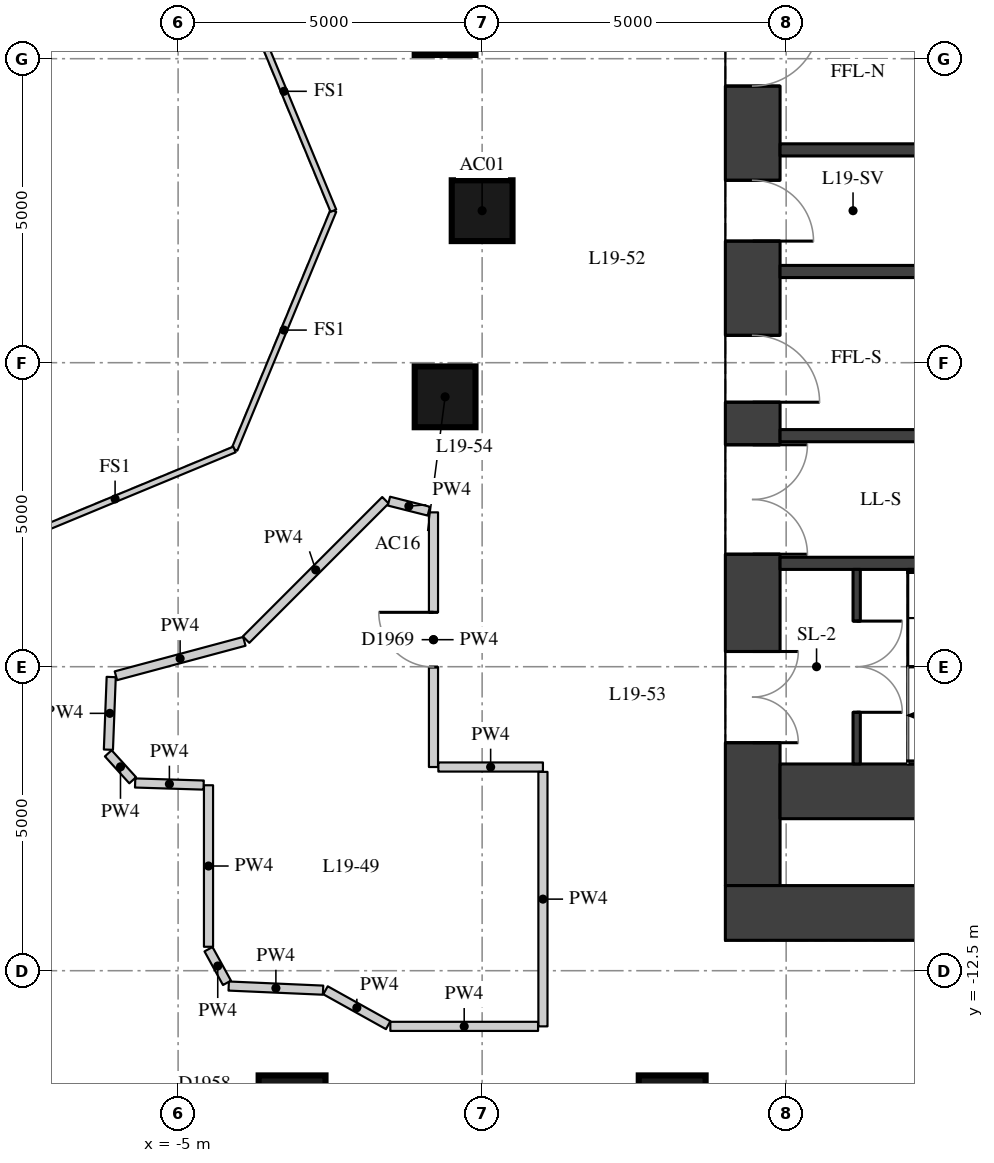
"""IFC4 building model, lengths in metres.
Left out: names, types, materials, properties, quantities, classifications, styles, units other than length and angle.
Written with IfcOpenShell. Run it as: python <this file> out.ifc"""

import sys

from ifc_helpers import new_model, si_unit, direction, frame, frame_2d, origin, origin_2d, place, context, subcontext, project, spatial, rectangle, extrude, element, fill, save


model = new_model("IFC4")
c1 = context("Model", 3, precision=1e-05, world=origin(), true_north=direction((0.0, 1.0)))
c2 = subcontext(c1, "Body", "Model", "MODEL_VIEW")
j1 = project(units=[si_unit("LENGTHUNIT", "METRE"), si_unit("PLANEANGLEUNIT", "RADIAN")], contexts=[c1])
p1 = place(None, origin())
s1 = spatial("IfcSite", under=j1, at=p1, CompositionType="ELEMENT")
p2 = place(p1, origin())
s2 = spatial("IfcBuilding", under=s1, at=p2, CompositionType="ELEMENT")
p3 = place(p2, frame((0.0, 0.0, 71.2)))
s3 = spatial("IfcBuildingStorey", under=s2, at=p3, CompositionType="ELEMENT", Elevation=71.2)
for number, where, z_axis, x_axis in (
    (1, (0.0, 0.0, 0.0), (0.0, 0.0, 1.0), (1.0, 0.0, 0.0)),
    (2, (-0.609, 3.062, 0.0), (0.0, 0.0, 1.0), (1.0, 0.0, 0.0)),
    (3, (-0.609, -3.062, 0.0), (0.0, 0.0, 1.0), (1.0, 0.0, 0.0)),
):
    element("IfcColumn", number, at=place(p3, frame(where, z_axis=z_axis, x_axis=x_axis)), inside=s3, PredefinedType="COLUMN", context=c2, shape_type="SweptSolid", body=[
        extrude(rectangle(XDim=1.0, YDim=1.0, at=origin_2d()), origin(), (0.0, 0.0, 1.0), 3.3),
    ])
for number, where, z_axis, x_axis in (
    (4, (-3.126, -14.772, 0.0), (0.0, 0.0, 1.0), (1.0, 0.0, 0.0)),
    (5, (3.126, -14.772, 0.0), (0.0, 0.0, 1.0), (1.0, 0.0, 0.0)),
):
    element("IfcColumn", number, at=place(p3, frame(where, z_axis=z_axis, x_axis=x_axis)), inside=s3, PredefinedType="COLUMN", context=c2, shape_type="SweptSolid", body=[
        extrude(rectangle(XDim=1.1, YDim=1.1, at=origin_2d()), origin(), (0.0, 0.0, 1.0), 3.3),
    ])
p4 = place(p3, frame((4.45, -11.1, 0.0), z_axis=(0.0, 0.0, 1.0), x_axis=(0.0, 1.0, 0.0)))
e6 = element("IfcWall", 6, at=p4, inside=s3, PredefinedType="SHEAR", context=c2, shape_type="SweptSolid", body=[
    extrude(rectangle(XDim=22.2, YDim=0.9, at=frame_2d((11.1, 0.0))), origin(), (0.0, 0.0, 1.0), 3.02),
])
p5 = place(p4, frame((2.35, 0.0, 0.0)))
e7 = element("IfcOpeningElement", 7, at=p5, cuts=e6, PredefinedType="OPENING", context=c2, shape_type="SweptSolid", body=[
    extrude(rectangle(XDim=1.5, YDim=2.1, at=frame_2d((0.75, 1.05))), frame((0.0, 0.46, 0.0), z_axis=(0.0, -1.0, 0.0), x_axis=(1.0, 0.0, 0.0)), (0.0, 0.0, 1.0), 0.92),
])
p6 = place(p4, frame((5.45, 0.0, 0.0)))
e8 = element("IfcOpeningElement", 8, at=p6, cuts=e6, PredefinedType="OPENING", context=c2, shape_type="SweptSolid", body=[
    extrude(rectangle(XDim=1.8, YDim=2.1, at=frame_2d((0.9, 1.05))), frame((0.0, 0.46, 0.0), z_axis=(0.0, -1.0, 0.0), x_axis=(1.0, 0.0, 0.0)), (0.0, 0.0, 1.0), 0.92),
])
p7 = place(p4, frame((7.95, 0.0, 0.0)))
e9 = element("IfcOpeningElement", 9, at=p7, cuts=e6, PredefinedType="OPENING", context=c2, shape_type="SweptSolid", body=[
    extrude(rectangle(XDim=1.1, YDim=2.1, at=frame_2d((0.55, 1.05))), frame((0.0, 0.46, 0.0), z_axis=(0.0, -1.0, 0.0), x_axis=(1.0, 0.0, 0.0)), (0.0, 0.0, 1.0), 0.92),
])
p8 = place(p4, frame((10.6, 0.0, 0.0)))
e10 = element("IfcOpeningElement", 10, at=p8, cuts=e6, PredefinedType="OPENING", context=c2, shape_type="SweptSolid", body=[
    extrude(rectangle(XDim=1.0, YDim=2.1, at=frame_2d((0.5, 1.05))), frame((0.0, 0.46, 0.0), z_axis=(0.0, -1.0, 0.0), x_axis=(1.0, 0.0, 0.0)), (0.0, 0.0, 1.0), 0.92),
])
p9 = place(p4, frame((13.15, 0.0, 0.0)))
e11 = element("IfcOpeningElement", 11, at=p9, cuts=e6, PredefinedType="OPENING", context=c2, shape_type="SweptSolid", body=[
    extrude(rectangle(XDim=1.1, YDim=2.1, at=frame_2d((0.55, 1.05))), frame((0.0, 0.46, 0.0), z_axis=(0.0, -1.0, 0.0), x_axis=(1.0, 0.0, 0.0)), (0.0, 0.0, 1.0), 0.92),
])
p10 = place(p4, frame((14.95, 0.0, 0.0)))
e12 = element("IfcOpeningElement", 12, at=p10, cuts=e6, PredefinedType="OPENING", context=c2, shape_type="SweptSolid", body=[
    extrude(rectangle(XDim=1.8, YDim=2.1, at=frame_2d((0.9, 1.05))), frame((0.0, 0.46, 0.0), z_axis=(0.0, -1.0, 0.0), x_axis=(1.0, 0.0, 0.0)), (0.0, 0.0, 1.0), 0.92),
])
p11 = place(p4, frame((18.35, 0.0, 0.0)))
e13 = element("IfcOpeningElement", 13, at=p11, cuts=e6, PredefinedType="OPENING", context=c2, shape_type="SweptSolid", body=[
    extrude(rectangle(XDim=1.5, YDim=2.1, at=frame_2d((0.75, 1.05))), frame((0.0, 0.46, 0.0), z_axis=(0.0, -1.0, 0.0), x_axis=(1.0, 0.0, 0.0)), (0.0, 0.0, 1.0), 0.92),
])
p12 = place(p3, frame((4.0, -11.55, 0.0), z_axis=(0.0, 0.0, 1.0), x_axis=(1.0, 0.0, 0.0)))
e14 = element("IfcWall", 14, at=p12, inside=s3, PredefinedType="SHEAR", context=c2, shape_type="SweptSolid", body=[
    extrude(rectangle(XDim=15.2, YDim=0.9, at=frame_2d((7.6, 0.0))), origin(), (0.0, 0.0, 1.0), 3.02),
])
p13 = place(p3, frame((4.9, -9.55, 0.0), z_axis=(0.0, 0.0, 1.0), x_axis=(1.0, 0.0, 0.0)))
e15 = element("IfcWall", 15, at=p13, inside=s3, PredefinedType="SHEAR", context=c2, shape_type="SweptSolid", body=[
    extrude(rectangle(XDim=10.2, YDim=0.9, at=frame_2d((5.1, 0.0))), origin(), (0.0, 0.0, 1.0), 3.02),
])
for number, where, z_axis, x_axis in (
    (16, (4.9, 1.0, 0.0), (0.0, 0.0, 1.0), (1.0, 0.0, 0.0)),
    (17, (4.9, -1.0, 0.0), (0.0, 0.0, 1.0), (1.0, 0.0, 0.0)),
):
    element("IfcWall", number, at=place(p3, frame(where, z_axis=z_axis, x_axis=x_axis)), inside=s3, PredefinedType="SHEAR", context=c2, shape_type="SweptSolid", body=[
        extrude(rectangle(XDim=10.2, YDim=0.2, at=frame_2d((5.1, 0.0))), origin(), (0.0, 0.0, 1.0), 3.02),
    ])
p14 = place(p3, frame((4.9, -3.7, 0.0), z_axis=(0.0, 0.0, 1.0), x_axis=(1.0, 0.0, 0.0)))
e18 = element("IfcWall", 18, at=p14, inside=s3, PredefinedType="SHEAR", context=c2, shape_type="SweptSolid", body=[
    extrude(rectangle(XDim=10.2, YDim=0.2, at=frame_2d((5.1, 0.0))), origin(), (0.0, 0.0, 1.0), 3.02),
])
p15 = place(p14, frame((6.3, 0.0, 0.0)))
e19 = element("IfcOpeningElement", 19, at=p15, cuts=e18, PredefinedType="OPENING", context=c2, shape_type="SweptSolid", body=[
    extrude(rectangle(XDim=1.1, YDim=2.1, at=frame_2d((0.55, 1.05))), frame((0.0, 0.11, 0.0), z_axis=(0.0, -1.0, 0.0), x_axis=(1.0, 0.0, 0.0)), (0.0, 0.0, 1.0), 0.22),
])
p16 = place(p14, frame((8.6, 0.0, 0.0)))
e20 = element("IfcOpeningElement", 20, at=p16, cuts=e18, PredefinedType="OPENING", context=c2, shape_type="SweptSolid", body=[
    extrude(rectangle(XDim=1.1, YDim=2.1, at=frame_2d((0.55, 1.05))), frame((0.0, 0.11, 0.0), z_axis=(0.0, -1.0, 0.0), x_axis=(1.0, 0.0, 0.0)), (0.0, 0.0, 1.0), 0.22),
])
p17 = place(p3, frame((4.9, -5.8, 0.0), z_axis=(0.0, 0.0, 1.0), x_axis=(1.0, 0.0, 0.0)))
e21 = element("IfcWall", 21, at=p17, inside=s3, PredefinedType="SHEAR", context=c2, shape_type="SweptSolid", body=[
    extrude(rectangle(XDim=10.2, YDim=0.2, at=frame_2d((5.1, 0.0))), origin(), (0.0, 0.0, 1.0), 3.02),
])
p18 = place(p3, frame((6.16, -9.1, 0.0), z_axis=(0.0, 0.0, 1.0), x_axis=(0.0, 1.0, 0.0)))
e22 = element("IfcWall", 22, at=p18, inside=s3, PredefinedType="SHEAR", context=c2, shape_type="SweptSolid", body=[
    extrude(rectangle(XDim=3.2, YDim=0.12, at=frame_2d((1.6, 0.0))), origin(), (0.0, 0.0, 1.0), 3.02),
])
p19 = place(p18, frame((0.85, 0.0, 0.0)))
e23 = element("IfcOpeningElement", 23, at=p19, cuts=e22, PredefinedType="OPENING", context=c2, shape_type="SweptSolid", body=[
    extrude(rectangle(XDim=1.5, YDim=2.1, at=frame_2d((0.75, 1.05))), frame((0.0, 0.07, 0.0), z_axis=(0.0, -1.0, 0.0), x_axis=(1.0, 0.0, 0.0)), (0.0, 0.0, 1.0), 0.14),
])
p20 = place(p3, frame((9.586, -13.719, 0.0), z_axis=(0.0, 0.0, 1.0), x_axis=(-0.888664904046, -0.458557181076, 0.0)))
e24 = element("IfcWall", 24, at=p20, inside=s3, PredefinedType="PARTITIONING", context=c2, shape_type="SweptSolid", body=[
    extrude(rectangle(XDim=3.046, YDim=0.2, at=frame_2d((1.523, 0.0))), origin(), (0.0, 0.0, 1.0), 3.02),
])
p21 = place(p3, frame((-0.8, -4.961, 0.0), z_axis=(0.0, 0.0, 1.0), x_axis=(0.0, -1.0, 0.0)))
e25 = element("IfcWall", 25, at=p21, inside=s3, PredefinedType="PARTITIONING", context=c2, shape_type="SweptSolid", body=[
    extrude(rectangle(XDim=4.188, YDim=0.15, at=frame_2d((2.094, 0.0))), origin(), (0.0, 0.0, 1.0), 3.02),
])
p22 = place(p21, frame((1.644, 0.0, 0.0)))
e26 = element("IfcOpeningElement", 26, at=p22, cuts=e25, PredefinedType="OPENING", context=c2, shape_type="SweptSolid", body=[
    extrude(rectangle(XDim=0.9, YDim=2.1, at=frame_2d((0.45, 1.05))), frame((0.0, 0.085, 0.0), z_axis=(0.0, -1.0, 0.0), x_axis=(1.0, 0.0, 0.0)), (0.0, 0.0, 1.0), 0.17),
])
p23 = place(p3, frame((-0.72, -9.15, 0.0), z_axis=(0.0, 0.0, 1.0), x_axis=(1.0, 0.0, 0.0)))
e27 = element("IfcWall", 27, at=p23, inside=s3, PredefinedType="PARTITIONING", context=c2, shape_type="SweptSolid", body=[
    extrude(rectangle(XDim=1.72, YDim=0.15, at=frame_2d((0.86, 0.0))), origin(), (0.0, 0.0, 1.0), 3.02),
])
p24 = place(p3, frame((1.0, -9.23, 0.0), z_axis=(0.0, 0.0, 1.0), x_axis=(0.0, -1.0, 0.0)))
e28 = element("IfcWall", 28, at=p24, inside=s3, PredefinedType="PARTITIONING", context=c2, shape_type="SweptSolid", body=[
    extrude(rectangle(XDim=4.186, YDim=0.15, at=frame_2d((2.093, 0.0))), origin(), (0.0, 0.0, 1.0), 3.02),
])
p25 = place(p3, frame((0.92, -13.416, 0.0), z_axis=(0.0, 0.0, 1.0), x_axis=(-1.0, 0.0, 0.0)))
e29 = element("IfcWall", 29, at=p25, inside=s3, PredefinedType="PARTITIONING", context=c2, shape_type="SweptSolid", body=[
    extrude(rectangle(XDim=2.43, YDim=0.15, at=frame_2d((1.215, 0.0))), origin(), (0.0, 0.0, 1.0), 3.02),
])
p26 = place(p3, frame((-1.545, -13.396, 0.0), z_axis=(0.0, 0.0, 1.0), x_axis=(-0.873678559566, 0.486503622345, 0.0)))
e30 = element("IfcWall", 30, at=p26, inside=s3, PredefinedType="PARTITIONING", context=c2, shape_type="SweptSolid", body=[
    extrude(rectangle(XDim=1.18, YDim=0.15, at=frame_2d((0.59, 0.0))), origin(), (0.0, 0.0, 1.0), 3.02),
])
p27 = place(p3, frame((-2.616, -12.82, 0.0), z_axis=(0.0, 0.0, 1.0), x_axis=(-0.99904515517, 0.04368956318, 0.0)))
e31 = element("IfcWall", 31, at=p27, inside=s3, PredefinedType="PARTITIONING", context=c2, shape_type="SweptSolid", body=[
    extrude(rectangle(XDim=1.553, YDim=0.15, at=frame_2d((0.777, 0.0))), origin(), (0.0, 0.0, 1.0), 3.02),
])
p28 = place(p3, frame((-4.196, -12.699, 0.0), z_axis=(0.0, 0.0, 1.0), x_axis=(-0.481398734925, 0.876501715921, 0.0)))
e32 = element("IfcWall", 32, at=p28, inside=s3, PredefinedType="PARTITIONING", context=c2, shape_type="SweptSolid", body=[
    extrude(rectangle(XDim=0.631, YDim=0.15, at=frame_2d((0.315, 0.0))), origin(), (0.0, 0.0, 1.0), 3.02),
])
p29 = place(p3, frame((-4.5, -12.106, 0.0), z_axis=(0.0, 0.0, 1.0), x_axis=(0.0, 1.0, 0.0)))
e33 = element("IfcWall", 33, at=p29, inside=s3, PredefinedType="PARTITIONING", context=c2, shape_type="SweptSolid", body=[
    extrude(rectangle(XDim=2.656, YDim=0.15, at=frame_2d((1.328, 0.0))), origin(), (0.0, 0.0, 1.0), 3.02),
])
p30 = place(p3, frame((-4.58, -9.447, 0.0), z_axis=(0.0, 0.0, 1.0), x_axis=(-0.999526758156, 0.030761334993, 0.0)))
e34 = element("IfcWall", 34, at=p30, inside=s3, PredefinedType="PARTITIONING", context=c2, shape_type="SweptSolid", body=[
    extrude(rectangle(XDim=1.127, YDim=0.15, at=frame_2d((0.563, 0.0))), origin(), (0.0, 0.0, 1.0), 3.02),
])
p31 = place(p3, frame((-5.747, -9.368, 0.0), z_axis=(0.0, 0.0, 1.0), x_axis=(-0.671757620202, 0.740771017049, 0.0)))
e35 = element("IfcWall", 35, at=p31, inside=s3, PredefinedType="PARTITIONING", context=c2, shape_type="SweptSolid", body=[
    extrude(rectangle(XDim=0.598, YDim=0.15, at=frame_2d((0.299, 0.0))), origin(), (0.0, 0.0, 1.0), 3.02),
])
p32 = place(p3, frame((-6.146, -8.865, 0.0), z_axis=(0.0, 0.0, 1.0), x_axis=(0.038582079081, 0.999255434398, 0.0)))
e36 = element("IfcWall", 36, at=p32, inside=s3, PredefinedType="PARTITIONING", context=c2, shape_type="SweptSolid", body=[
    extrude(rectangle(XDim=1.196, YDim=0.15, at=frame_2d((0.598, 0.0))), origin(), (0.0, 0.0, 1.0), 3.02),
])
p33 = place(p3, frame((-6.023, -7.649, 0.0), z_axis=(0.0, 0.0, 1.0), x_axis=(0.965906186456, 0.258892330836, 0.0)))
e37 = element("IfcWall", 37, at=p33, inside=s3, PredefinedType="PARTITIONING", context=c2, shape_type="SweptSolid", body=[
    extrude(rectangle(XDim=2.187, YDim=0.15, at=frame_2d((1.093, 0.0))), origin(), (0.0, 0.0, 1.0), 3.02),
])
p34 = place(p3, frame((-3.882, -7.055, 0.0), z_axis=(0.0, 0.0, 1.0), x_axis=(0.707069126061, 0.707144434307, 0.0)))
e38 = element("IfcWall", 38, at=p34, inside=s3, PredefinedType="PARTITIONING", context=c2, shape_type="SweptSolid", body=[
    extrude(rectangle(XDim=3.242, YDim=0.15, at=frame_2d((1.621, 0.0))), origin(), (0.0, 0.0, 1.0), 3.02),
])
p35 = place(p3, frame((-1.532, -4.777, 0.0), z_axis=(0.0, 0.0, 1.0), x_axis=(0.969694394352, -0.244321062461, 0.0)))
e39 = element("IfcWall", 39, at=p35, inside=s3, PredefinedType="PARTITIONING", context=c2, shape_type="SweptSolid", body=[
    extrude(rectangle(XDim=0.676, YDim=0.15, at=frame_2d((0.338, 0.0))), origin(), (0.0, 0.0, 1.0), 3.02),
])
for number, where, z_axis, x_axis in (
    (40, (-2.446, 0.0, 0.0), (0.0, 0.0, 1.0), (-0.383, -0.924, 0.0)),
    (41, (-4.073, -3.927, 0.0), (0.0, 0.0, 1.0), (-0.924, -0.383, 0.0)),
    (42, (-4.073, 3.927, 0.0), (0.0, 0.0, 1.0), (0.383, -0.924, 0.0)),
):
    element("IfcWall", number, at=place(p3, frame(where, z_axis=z_axis, x_axis=x_axis)), inside=s3, PredefinedType="PARTITIONING", context=c2, shape_type="SweptSolid", body=[
        extrude(rectangle(XDim=4.251, YDim=0.1, at=frame_2d((2.125, 0.0))), origin(), (0.0, 0.0, 1.0), 3.02),
    ])
p36 = place(p5, origin())
e43 = element("IfcDoor", 43, at=p36, inside=s3, OperationType="DOUBLE_DOOR_SINGLE_SWING", PredefinedType="DOOR", context=c2, shape_type="SweptSolid", body=[
    extrude(rectangle(XDim=1.5, YDim=2.1, at=frame_2d((0.75, 1.05))), frame((0.0, 0.025, 0.0), z_axis=(0.0, -1.0, 0.0), x_axis=(1.0, 0.0, 0.0)), (0.0, 0.0, 1.0), 0.05),
])
fill(e7, e43)
p37 = place(p6, origin())
e44 = element("IfcDoor", 44, at=p37, inside=s3, OperationType="DOUBLE_DOOR_SINGLE_SWING", PredefinedType="DOOR", context=c2, shape_type="SweptSolid", body=[
    extrude(rectangle(XDim=1.8, YDim=2.1, at=frame_2d((0.9, 1.05))), frame((0.0, 0.025, 0.0), z_axis=(0.0, -1.0, 0.0), x_axis=(1.0, 0.0, 0.0)), (0.0, 0.0, 1.0), 0.05),
])
fill(e8, e44)
p38 = place(p7, origin())
e45 = element("IfcDoor", 45, at=p38, inside=s3, OperationType="SINGLE_SWING_RIGHT", PredefinedType="DOOR", context=c2, shape_type="SweptSolid", body=[
    extrude(rectangle(XDim=1.1, YDim=2.1, at=frame_2d((0.55, 1.05))), frame((0.0, 0.025, 0.0), z_axis=(0.0, -1.0, 0.0), x_axis=(1.0, 0.0, 0.0)), (0.0, 0.0, 1.0), 0.05),
])
fill(e9, e45)
p39 = place(p8, origin())
e46 = element("IfcDoor", 46, at=p39, inside=s3, OperationType="SINGLE_SWING_RIGHT", PredefinedType="DOOR", context=c2, shape_type="SweptSolid", body=[
    extrude(rectangle(XDim=1.0, YDim=2.1, at=frame_2d((0.5, 1.05))), frame((0.0, 0.025, 0.0), z_axis=(0.0, -1.0, 0.0), x_axis=(1.0, 0.0, 0.0)), (0.0, 0.0, 1.0), 0.05),
])
fill(e10, e46)
p40 = place(p9, origin())
e47 = element("IfcDoor", 47, at=p40, inside=s3, OperationType="SINGLE_SWING_LEFT", PredefinedType="DOOR", context=c2, shape_type="SweptSolid", body=[
    extrude(rectangle(XDim=1.1, YDim=2.1, at=frame_2d((0.55, 1.05))), frame((0.0, 0.025, 0.0), z_axis=(0.0, -1.0, 0.0), x_axis=(1.0, 0.0, 0.0)), (0.0, 0.0, 1.0), 0.05),
])
fill(e11, e47)
p41 = place(p19, origin())
e48 = element("IfcDoor", 48, at=p41, inside=s3, OperationType="DOUBLE_DOOR_SINGLE_SWING", PredefinedType="DOOR", context=c2, shape_type="SweptSolid", body=[
    extrude(rectangle(XDim=1.5, YDim=2.1, at=frame_2d((0.75, 1.05))), frame((0.0, 0.025, 0.0), z_axis=(0.0, -1.0, 0.0), x_axis=(1.0, 0.0, 0.0)), (0.0, 0.0, 1.0), 0.05),
])
fill(e23, e48)
p42 = place(p22, origin())
e49 = element("IfcDoor", 49, at=p42, inside=s3, OperationType="SINGLE_SWING_RIGHT", PredefinedType="DOOR", context=c2, shape_type="SweptSolid", body=[
    extrude(rectangle(XDim=0.9, YDim=2.1, at=frame_2d((0.45, 1.05))), frame((0.0, 0.025, 0.0), z_axis=(0.0, -1.0, 0.0), x_axis=(1.0, 0.0, 0.0)), (0.0, 0.0, 1.0), 0.05),
])
fill(e26, e49)
save(model, sys.argv[1])
